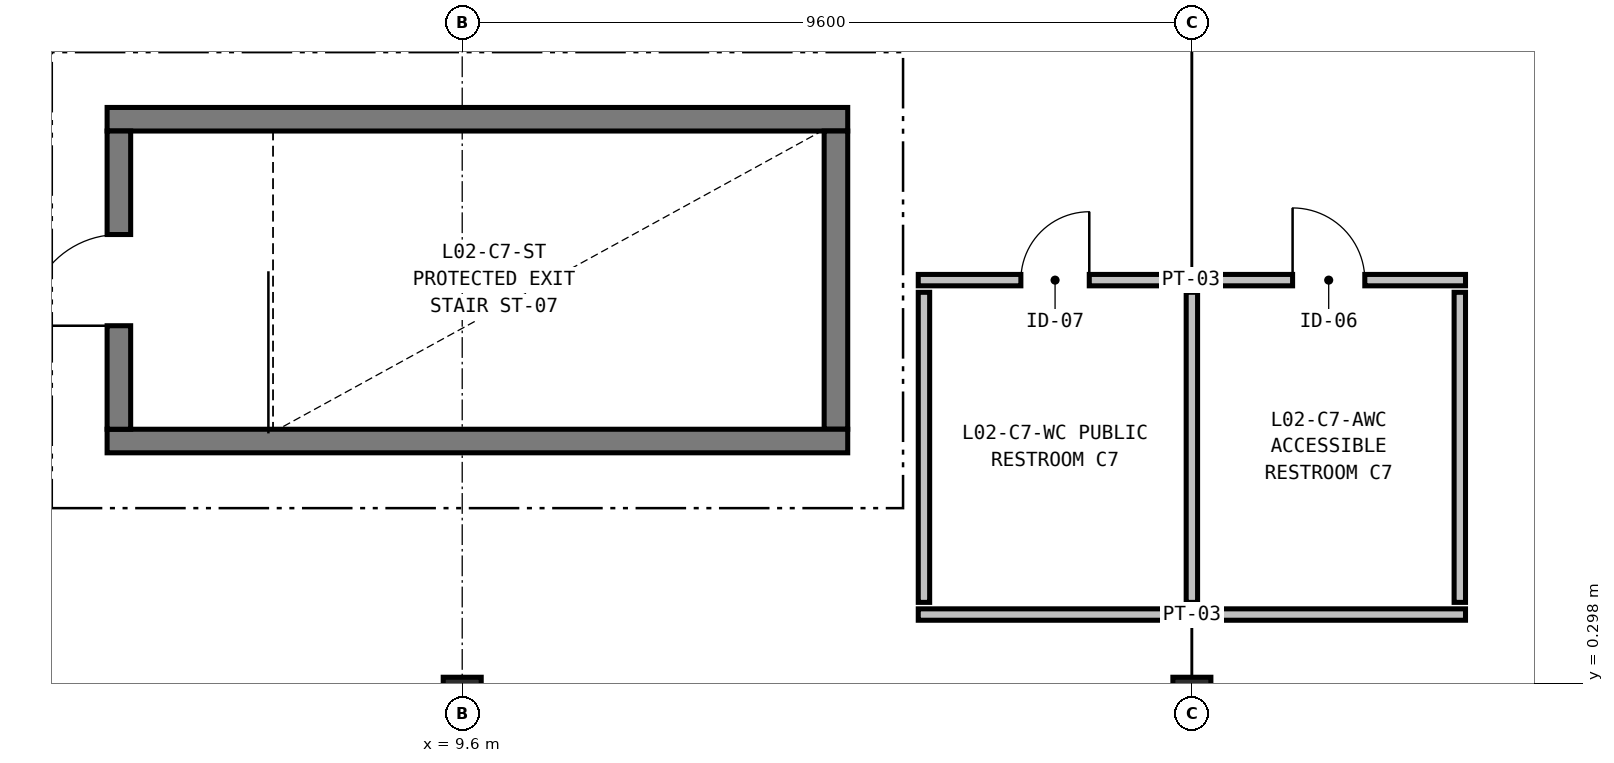
"""IFC4 building model, lengths in metres.
Left out: names, types, materials, properties, quantities, classifications, styles, units other than length and angle.
Written with IfcOpenShell. Run it as: python <this file> out.ifc"""

import sys

from ifc_helpers import new_model, si_unit, direction, frame, frame_2d, origin, origin_2d, place, context, subcontext, project, spatial, rectangle, extrude, element, fill, save


model = new_model("IFC4")
c1 = context("Model", 3, precision=1e-05, world=origin(), true_north=direction((0.0, 1.0)))
c2 = subcontext(c1, "Body", "Model", "MODEL_VIEW")
j1 = project(units=[si_unit("LENGTHUNIT", "METRE"), si_unit("PLANEANGLEUNIT", "RADIAN")], contexts=[c1])
p1 = place(None, origin())
s1 = spatial("IfcSite", under=j1, at=p1, CompositionType="ELEMENT")
p2 = place(p1, origin())
s2 = spatial("IfcBuilding", under=s1, at=p2, CompositionType="ELEMENT")
p3 = place(p2, frame((0.0, 0.0, 11.4)))
s3 = spatial("IfcBuildingStorey", under=s2, at=p3, CompositionType="ELEMENT", Elevation=11.4)
for number, where, z_axis, x_axis in (
    (1, (9.6, 0.0, 0.0), (0.0, 0.0, 1.0), (1.0, 0.0, 0.0)),
    (2, (19.2, 0.0, 0.0), (0.0, 0.0, 1.0), (1.0, 0.0, 0.0)),
):
    element("IfcColumn", number, at=place(p3, frame(where, z_axis=z_axis, x_axis=x_axis)), inside=s3, PredefinedType="COLUMN", context=c2, shape_type="SweptSolid", body=[
        extrude(rectangle(XDim=0.5, YDim=0.75, at=origin_2d()), origin(), (0.0, 0.0, 1.0), 5.4),
    ])
p4 = place(p3, frame((4.928, 7.717, 0.0), z_axis=(0.0, 0.0, 1.0), x_axis=(1.0, 0.0, 0.0)))
e3 = element("IfcWall", 3, at=p4, inside=s3, PredefinedType="SHEAR", context=c2, shape_type="SweptSolid", body=[
    extrude(rectangle(XDim=9.744, YDim=0.31, at=frame_2d((4.872, 0.0))), origin(), (0.0, 0.0, 1.0), 5.1),
])
p5 = place(p3, frame((14.517, 7.562, 0.0), z_axis=(0.0, 0.0, 1.0), x_axis=(0.0, -1.0, 0.0)))
e4 = element("IfcWall", 4, at=p5, inside=s3, PredefinedType="SHEAR", context=c2, shape_type="SweptSolid", body=[
    extrude(rectangle(XDim=3.924, YDim=0.31, at=frame_2d((1.962, 0.0))), origin(), (0.0, 0.0, 1.0), 5.1),
])
p6 = place(p3, frame((14.672, 3.483, 0.0), z_axis=(0.0, 0.0, 1.0), x_axis=(-1.0, 0.0, 0.0)))
e5 = element("IfcWall", 5, at=p6, inside=s3, PredefinedType="SHEAR", context=c2, shape_type="SweptSolid", body=[
    extrude(rectangle(XDim=9.744, YDim=0.31, at=frame_2d((4.872, 0.0))), origin(), (0.0, 0.0, 1.0), 5.1),
])
p7 = place(p3, frame((5.083, 3.638, 0.0), z_axis=(0.0, 0.0, 1.0), x_axis=(0.0, 1.0, 0.0)))
e6 = element("IfcWall", 6, at=p7, inside=s3, PredefinedType="SHEAR", context=c2, shape_type="SweptSolid", body=[
    extrude(rectangle(XDim=3.924, YDim=0.31, at=frame_2d((1.962, 0.0))), origin(), (0.0, 0.0, 1.0), 5.1),
])
p8 = place(p7, frame((1.362, 0.0, 0.0)))
e7 = element("IfcOpeningElement", 7, at=p8, cuts=e6, PredefinedType="OPENING", context=c2, shape_type="SweptSolid", body=[
    extrude(rectangle(XDim=1.2, YDim=2.2, at=frame_2d((0.6, 1.1))), frame((0.0, 0.165, 0.0), z_axis=(0.0, -1.0, 0.0), x_axis=(1.0, 0.0, 0.0)), (0.0, 0.0, 1.0), 0.33),
])
p9 = place(p3, frame((15.6, 5.6, 0.0), z_axis=(0.0, 0.0, 1.0), x_axis=(1.0, 0.0, 0.0)))
e8 = element("IfcWall", 8, at=p9, inside=s3, PredefinedType="PARTITIONING", context=c2, shape_type="SweptSolid", body=[
    extrude(rectangle(XDim=7.2, YDim=0.15, at=frame_2d((3.6, 0.0))), origin(), (0.0, 0.0, 1.0), 3.825),
])
p10 = place(p9, frame((1.35, 0.0, 0.0)))
e9 = element("IfcOpeningElement", 9, at=p10, cuts=e8, PredefinedType="OPENING", context=c2, shape_type="SweptSolid", body=[
    extrude(rectangle(XDim=0.9, YDim=2.1, at=frame_2d((0.45, 1.05))), frame((0.0, 0.085, 0.0), z_axis=(0.0, -1.0, 0.0), x_axis=(1.0, 0.0, 0.0)), (0.0, 0.0, 1.0), 0.17),
])
p11 = place(p9, frame((4.925, 0.0, 0.0)))
e10 = element("IfcOpeningElement", 10, at=p11, cuts=e8, PredefinedType="OPENING", context=c2, shape_type="SweptSolid", body=[
    extrude(rectangle(XDim=0.95, YDim=2.15, at=frame_2d((0.475, 1.075))), frame((0.0, 0.085, 0.0), z_axis=(0.0, -1.0, 0.0), x_axis=(1.0, 0.0, 0.0)), (0.0, 0.0, 1.0), 0.17),
])
p12 = place(p3, frame((15.6, 1.2, 0.0), z_axis=(0.0, 0.0, 1.0), x_axis=(1.0, 0.0, 0.0)))
e11 = element("IfcWall", 11, at=p12, inside=s3, PredefinedType="PARTITIONING", context=c2, shape_type="SweptSolid", body=[
    extrude(rectangle(XDim=7.2, YDim=0.15, at=frame_2d((3.6, 0.0))), origin(), (0.0, 0.0, 1.0), 3.825),
])
p13 = place(p3, frame((15.675, 1.36, 0.0), z_axis=(0.0, 0.0, 1.0), x_axis=(0.0, 1.0, 0.0)))
e12 = element("IfcWall", 12, at=p13, inside=s3, PredefinedType="PARTITIONING", context=c2, shape_type="SweptSolid", body=[
    extrude(rectangle(XDim=4.08, YDim=0.15, at=frame_2d((2.04, 0.0))), origin(), (0.0, 0.0, 1.0), 5.1),
])
p14 = place(p3, frame((19.2, 1.36, 0.0), z_axis=(0.0, 0.0, 1.0), x_axis=(0.0, 1.0, 0.0)))
e13 = element("IfcWall", 13, at=p14, inside=s3, PredefinedType="PARTITIONING", context=c2, shape_type="SweptSolid", body=[
    extrude(rectangle(XDim=4.08, YDim=0.15, at=frame_2d((2.04, 0.0))), origin(), (0.0, 0.0, 1.0), 3.825),
])
p15 = place(p3, frame((22.725, 1.36, 0.0), z_axis=(0.0, 0.0, 1.0), x_axis=(0.0, 1.0, 0.0)))
e14 = element("IfcWall", 14, at=p15, inside=s3, PredefinedType="PARTITIONING", context=c2, shape_type="SweptSolid", body=[
    extrude(rectangle(XDim=4.08, YDim=0.15, at=frame_2d((2.04, 0.0))), origin(), (0.0, 0.0, 1.0), 5.1),
])
p16 = place(p8, origin())
e15 = element("IfcDoor", 15, at=p16, inside=s3, OperationType="SINGLE_SWING_LEFT", PredefinedType="DOOR", context=c2, shape_type="SweptSolid", body=[
    extrude(rectangle(XDim=1.2, YDim=2.2, at=frame_2d((0.6, 1.1))), frame((0.0, 0.025, 0.0), z_axis=(0.0, -1.0, 0.0), x_axis=(1.0, 0.0, 0.0)), (0.0, 0.0, 1.0), 0.05),
])
fill(e7, e15)
p17 = place(p10, origin())
e16 = element("IfcDoor", 16, at=p17, inside=s3, OperationType="SINGLE_SWING_RIGHT", PredefinedType="DOOR", context=c2, shape_type="SweptSolid", body=[
    extrude(rectangle(XDim=0.9, YDim=2.1, at=frame_2d((0.45, 1.05))), frame((0.0, 0.025, 0.0), z_axis=(0.0, -1.0, 0.0), x_axis=(1.0, 0.0, 0.0)), (0.0, 0.0, 1.0), 0.05),
])
fill(e9, e16)
p18 = place(p11, origin())
e17 = element("IfcDoor", 17, at=p18, inside=s3, OperationType="SINGLE_SWING_LEFT", PredefinedType="DOOR", context=c2, shape_type="SweptSolid", body=[
    extrude(rectangle(XDim=0.95, YDim=2.15, at=frame_2d((0.475, 1.075))), frame((0.0, 0.025, 0.0), z_axis=(0.0, -1.0, 0.0), x_axis=(1.0, 0.0, 0.0)), (0.0, 0.0, 1.0), 0.05),
])
fill(e10, e17)
save(model, sys.argv[1])
